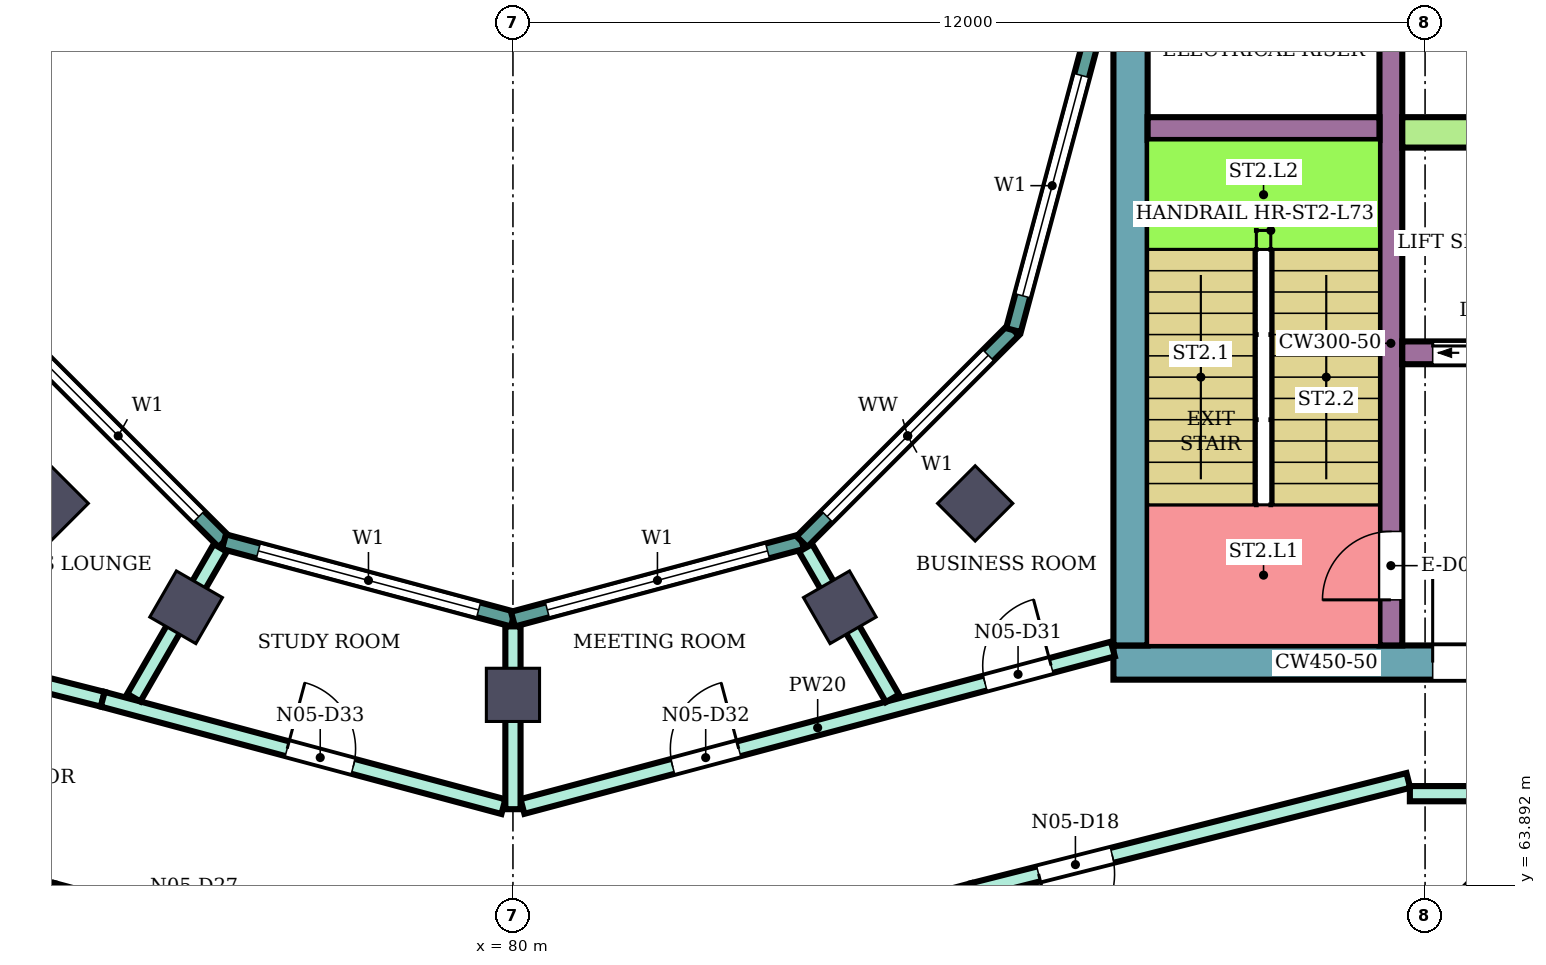
"""IFC4 building model, lengths in metres.
Left out: names, types, materials, properties, quantities, classifications, styles, units other than length and angle.
Written with IfcOpenShell. Run it as: python <this file> out.ifc"""

import sys

from ifc_helpers import new_model, si_unit, direction, frame, frame_2d, origin, origin_2d, place, context, subcontext, project, spatial, rectangle, extrude, element, fill, save


model = new_model("IFC4")
c1 = context("Model", 3, precision=1e-05, world=origin(), true_north=direction((0.0, 1.0)))
c2 = subcontext(c1, "Body", "Model", "MODEL_VIEW")
j1 = project(units=[si_unit("LENGTHUNIT", "METRE"), si_unit("PLANEANGLEUNIT", "RADIAN")], contexts=[c1])
p1 = place(None, origin())
s1 = spatial("IfcSite", under=j1, at=p1, CompositionType="ELEMENT")
p2 = place(p1, origin())
s2 = spatial("IfcBuilding", under=s1, at=p2, CompositionType="ELEMENT")
p3 = place(p2, frame((0.0, 0.0, 319.3)))
s3 = spatial("IfcBuildingStorey", under=s2, at=p3, CompositionType="ELEMENT", Elevation=319.3)
for number, where, z_axis, x_axis in (
    (1, (73.919, 68.919, 0.0), (0.0, 0.0, 1.0), (-0.707, -0.707, 0.0)),
    (2, (75.7, 67.552, 0.0), (0.0, 0.0, 1.0), (-0.5, -0.866, 0.0)),
    (3, (80.0, 66.4, 0.0), (0.0, 0.0, 1.0), (0.0, -1.0, 0.0)),
    (4, (84.3, 67.552, 0.0), (0.0, 0.0, 1.0), (0.5, -0.866, 0.0)),
    (5, (86.081, 68.919, 0.0), (0.0, 0.0, 1.0), (0.707, -0.707, 0.0)),
):
    element("IfcColumn", number, at=place(p3, frame(where, z_axis=z_axis, x_axis=x_axis)), inside=s3, PredefinedType="COLUMN", context=c2, shape_type="SweptSolid", body=[
        extrude(rectangle(XDim=0.7, YDim=0.7, at=origin_2d()), origin(), (0.0, 0.0, 1.0), 4.4),
    ])
p4 = place(p3, frame((92.233, 62.767, 0.0), z_axis=(0.0, 0.0, 1.0), x_axis=(0.707106781187, -0.707106781187, 0.0)))
e6 = element("IfcColumn", 6, at=p4, inside=s3, PredefinedType="COLUMN", context=c2, shape_type="SweptSolid", body=[
    extrude(rectangle(XDim=1.2, YDim=2.4, at=origin_2d()), origin(), (0.0, 0.0, 1.0), 4.4),
])
p5 = place(p3, frame((87.9, 66.825, 0.0), z_axis=(0.0, 0.0, 1.0), x_axis=(1.0, 0.0, 0.0)))
e7 = element("IfcWall", 7, at=p5, inside=s3, PredefinedType="SHEAR", context=c2, shape_type="SweptSolid", body=[
    extrude(rectangle(XDim=10.0, YDim=0.45, at=frame_2d((5.0, 0.0))), origin(), (0.0, 0.0, 1.0), 4.08),
])
p6 = place(p5, frame((4.2, 0.0, 0.0)))
e8 = element("IfcOpeningElement", 8, at=p6, cuts=e7, PredefinedType="OPENING", context=c2, shape_type="SweptSolid", body=[
    extrude(rectangle(XDim=2.4, YDim=2.4, at=frame_2d((1.2, 1.2))), frame((0.0, 0.235, 0.0), z_axis=(0.0, -1.0, 0.0), x_axis=(1.0, 0.0, 0.0)), (0.0, 0.0, 1.0), 0.47),
])
p7 = place(p3, frame((88.125, 67.05, 0.0), z_axis=(0.0, 0.0, 1.0), x_axis=(0.0, 1.0, 0.0)))
e9 = element("IfcWall", 9, at=p7, inside=s3, PredefinedType="SHEAR", context=c2, shape_type="SweptSolid", body=[
    extrude(rectangle(XDim=7.95, YDim=0.45, at=frame_2d((3.975, 0.0))), origin(), (0.0, 0.0, 1.0), 4.08),
])
p8 = place(p3, frame((91.55, 67.05, 0.0), z_axis=(0.0, 0.0, 1.0), x_axis=(0.0, 1.0, 0.0)))
e10 = element("IfcWall", 10, at=p8, inside=s3, PredefinedType="SHEAR", context=c2, shape_type="SweptSolid", body=[
    extrude(rectangle(XDim=7.95, YDim=0.3, at=frame_2d((3.975, 0.0))), origin(), (0.0, 0.0, 1.0), 4.08),
])
p9 = place(p8, frame((0.6, 0.0, 0.0)))
e11 = element("IfcOpeningElement", 11, at=p9, cuts=e10, PredefinedType="OPENING", context=c2, shape_type="SweptSolid", body=[
    extrude(rectangle(XDim=0.9, YDim=2.1, at=frame_2d((0.45, 1.05))), frame((0.0, 0.16, 0.0), z_axis=(0.0, -1.0, 0.0), x_axis=(1.0, 0.0, 0.0)), (0.0, 0.0, 1.0), 0.32),
])
p10 = place(p3, frame((88.35, 73.85, 0.0), z_axis=(0.0, 0.0, 1.0), x_axis=(1.0, 0.0, 0.0)))
e12 = element("IfcWall", 12, at=p10, inside=s3, PredefinedType="SHEAR", context=c2, shape_type="SweptSolid", body=[
    extrude(rectangle(XDim=3.05, YDim=0.3, at=frame_2d((1.525, 0.0))), origin(), (0.0, 0.0, 1.0), 4.08),
])
p11 = place(p3, frame((91.7, 73.8, 0.0), z_axis=(0.0, 0.0, 1.0), x_axis=(1.0, 0.0, 0.0)))
e13 = element("IfcWall", 13, at=p11, inside=s3, PredefinedType="SHEAR", context=c2, shape_type="SweptSolid", body=[
    extrude(rectangle(XDim=5.75, YDim=0.4, at=frame_2d((2.875, 0.0))), origin(), (0.0, 0.0, 1.0), 4.08),
])
p12 = place(p3, frame((91.7, 70.9, 0.0), z_axis=(0.0, 0.0, 1.0), x_axis=(1.0, 0.0, 0.0)))
e14 = element("IfcWall", 14, at=p12, inside=s3, PredefinedType="SHEAR", context=c2, shape_type="SweptSolid", body=[
    extrude(rectangle(XDim=7.3, YDim=0.3, at=frame_2d((3.65, 0.0))), origin(), (0.0, 0.0, 1.0), 4.08),
])
p13 = place(p12, frame((0.4, 0.0, 0.0)))
e15 = element("IfcOpeningElement", 15, at=p13, cuts=e14, PredefinedType="OPENING", context=c2, shape_type="SweptSolid", body=[
    extrude(rectangle(XDim=1.4, YDim=2.1, at=frame_2d((0.7, 1.05))), frame((0.0, 0.16, 0.0), z_axis=(0.0, -1.0, 0.0), x_axis=(1.0, 0.0, 0.0)), (0.0, 0.0, 1.0), 0.32),
])
p14 = place(p12, frame((3.0, 0.0, 0.0)))
e16 = element("IfcOpeningElement", 16, at=p14, cuts=e14, PredefinedType="OPENING", context=c2, shape_type="SweptSolid", body=[
    extrude(rectangle(XDim=1.2, YDim=2.1, at=frame_2d((0.6, 1.05))), frame((0.0, 0.16, 0.0), z_axis=(0.0, -1.0, 0.0), x_axis=(1.0, 0.0, 0.0)), (0.0, 0.0, 1.0), 0.32),
])
p15 = place(p12, frame((5.025, 0.0, 0.0)))
e17 = element("IfcOpeningElement", 17, at=p15, cuts=e14, PredefinedType="OPENING", context=c2, shape_type="SweptSolid", body=[
    extrude(rectangle(XDim=0.7, YDim=2.1, at=frame_2d((0.35, 1.05))), frame((0.0, 0.16, 0.0), z_axis=(0.0, -1.0, 0.0), x_axis=(1.0, 0.0, 0.0)), (0.0, 0.0, 1.0), 0.32),
])
p16 = place(p3, frame((73.415, 71.198, 0.0), z_axis=(0.0, 0.0, 1.0), x_axis=(0.707106781187, -0.707106781187, 0.0)))
e18 = element("IfcWall", 18, at=p16, inside=s3, PredefinedType="NOTDEFINED", context=c2, shape_type="SweptSolid", body=[
    extrude(rectangle(XDim=3.936, YDim=0.2, at=frame_2d((1.968, 0.0))), origin(), (0.0, 0.0, 1.0), 4.4),
])
p17 = place(p16, frame((0.468, 0.0, 0.9)))
e19 = element("IfcOpeningElement", 19, at=p17, cuts=e18, PredefinedType="OPENING", context=c2, shape_type="SweptSolid", body=[
    extrude(rectangle(XDim=3.0, YDim=2.3, at=frame_2d((1.5, 1.15))), frame((0.0, 0.11, 0.0), z_axis=(0.0, -1.0, 0.0), x_axis=(1.0, 0.0, 0.0)), (0.0, 0.0, 1.0), 0.22),
])
p18 = place(p3, frame((76.198, 68.415, 0.0), z_axis=(0.0, 0.0, 1.0), x_axis=(0.965933654434, -0.258789828301, 0.0)))
e20 = element("IfcWall", 20, at=p18, inside=s3, PredefinedType="NOTDEFINED", context=c2, shape_type="SweptSolid", body=[
    extrude(rectangle(XDim=3.936, YDim=0.2, at=frame_2d((1.968, 0.0))), origin(), (0.0, 0.0, 1.0), 4.4),
])
p19 = place(p18, frame((0.468, 0.0, 0.9)))
e21 = element("IfcOpeningElement", 21, at=p19, cuts=e20, PredefinedType="OPENING", context=c2, shape_type="SweptSolid", body=[
    extrude(rectangle(XDim=3.0, YDim=2.3, at=frame_2d((1.5, 1.15))), frame((0.0, 0.11, 0.0), z_axis=(0.0, -1.0, 0.0), x_axis=(1.0, 0.0, 0.0)), (0.0, 0.0, 1.0), 0.22),
])
p20 = place(p3, frame((80.0, 67.396, 0.0), z_axis=(0.0, 0.0, 1.0), x_axis=(0.965933654434, 0.258789828301, 0.0)))
e22 = element("IfcWall", 22, at=p20, inside=s3, PredefinedType="NOTDEFINED", context=c2, shape_type="SweptSolid", body=[
    extrude(rectangle(XDim=3.936, YDim=0.2, at=frame_2d((1.968, 0.0))), origin(), (0.0, 0.0, 1.0), 4.4),
])
p21 = place(p20, frame((0.468, 0.0, 0.9)))
e23 = element("IfcOpeningElement", 23, at=p21, cuts=e22, PredefinedType="OPENING", context=c2, shape_type="SweptSolid", body=[
    extrude(rectangle(XDim=3.0, YDim=2.3, at=frame_2d((1.5, 1.15))), frame((0.0, 0.11, 0.0), z_axis=(0.0, -1.0, 0.0), x_axis=(1.0, 0.0, 0.0)), (0.0, 0.0, 1.0), 0.22),
])
p22 = place(p3, frame((83.802, 68.415, 0.0), z_axis=(0.0, 0.0, 1.0), x_axis=(0.707106781187, 0.707106781187, 0.0)))
e24 = element("IfcWall", 24, at=p22, inside=s3, PredefinedType="NOTDEFINED", context=c2, shape_type="SweptSolid", body=[
    extrude(rectangle(XDim=3.936, YDim=0.2, at=frame_2d((1.968, 0.0))), origin(), (0.0, 0.0, 1.0), 4.4),
])
p23 = place(p22, frame((0.468, 0.0, 0.9)))
e25 = element("IfcOpeningElement", 25, at=p23, cuts=e24, PredefinedType="OPENING", context=c2, shape_type="SweptSolid", body=[
    extrude(rectangle(XDim=3.0, YDim=2.3, at=frame_2d((1.5, 1.15))), frame((0.0, 0.11, 0.0), z_axis=(0.0, -1.0, 0.0), x_axis=(1.0, 0.0, 0.0)), (0.0, 0.0, 1.0), 0.22),
])
p24 = place(p3, frame((86.585, 71.198, 0.0), z_axis=(0.0, 0.0, 1.0), x_axis=(0.258789828301, 0.965933654434, 0.0)))
e26 = element("IfcWall", 26, at=p24, inside=s3, PredefinedType="NOTDEFINED", context=c2, shape_type="SweptSolid", body=[
    extrude(rectangle(XDim=3.936, YDim=0.2, at=frame_2d((1.968, 0.0))), origin(), (0.0, 0.0, 1.0), 4.4),
])
p25 = place(p24, frame((0.468, 0.0, 0.9)))
e27 = element("IfcOpeningElement", 27, at=p25, cuts=e26, PredefinedType="OPENING", context=c2, shape_type="SweptSolid", body=[
    extrude(rectangle(XDim=3.0, YDim=2.3, at=frame_2d((1.5, 1.15))), frame((0.0, 0.11, 0.0), z_axis=(0.0, -1.0, 0.0), x_axis=(1.0, 0.0, 0.0)), (0.0, 0.0, 1.0), 0.22),
])
p26 = place(p3, frame((68.201, 65.28, 0.0), z_axis=(0.0, 0.0, 1.0), x_axis=(0.969421088032, -0.245403247897, 0.0)))
e28 = element("IfcWall", 28, at=p26, inside=s3, PredefinedType="PARTITIONING", context=c2, shape_type="SweptSolid", body=[
    extrude(rectangle(XDim=5.927, YDim=0.2, at=frame_2d((2.964, 0.0))), origin(), (0.0, 0.0, 1.0), 3.95),
])
p27 = place(p3, frame((72.1, 66.975, 0.0), z_axis=(0.0, 0.0, 1.0), x_axis=(0.969471314457, -0.245204752086, 0.0)))
e29 = element("IfcWall", 29, at=p27, inside=s3, PredefinedType="PARTITIONING", context=c2, shape_type="SweptSolid", body=[
    extrude(rectangle(XDim=2.582, YDim=0.2, at=frame_2d((1.291, 0.0))), origin(), (0.0, 0.0, 1.0), 3.95),
])
p28 = place(p27, frame((0.841, 0.0, 0.0)))
e30 = element("IfcOpeningElement", 30, at=p28, cuts=e29, PredefinedType="OPENING", context=c2, shape_type="SweptSolid", body=[
    extrude(rectangle(XDim=0.9, YDim=2.1, at=frame_2d((0.45, 1.05))), frame((0.0, 0.11, 0.0), z_axis=(0.0, -1.0, 0.0), x_axis=(1.0, 0.0, 0.0)), (0.0, 0.0, 1.0), 0.22),
])
p29 = place(p3, frame((73.947, 63.826, 0.0), z_axis=(0.0, 0.0, 1.0), x_axis=(0.965894934009, -0.25893430915, 0.0)))
e31 = element("IfcWall", 31, at=p29, inside=s3, PredefinedType="PARTITIONING", context=c2, shape_type="SweptSolid", body=[
    extrude(rectangle(XDim=6.177, YDim=0.2, at=frame_2d((3.088, 0.0))), origin(), (0.0, 0.0, 1.0), 3.95),
])
p30 = place(p29, frame((3.336, 0.0, 0.0)))
e32 = element("IfcOpeningElement", 32, at=p30, cuts=e31, PredefinedType="OPENING", context=c2, shape_type="SweptSolid", body=[
    extrude(rectangle(XDim=1.0, YDim=2.1, at=frame_2d((0.5, 1.05))), frame((0.0, 0.11, 0.0), z_axis=(0.0, -1.0, 0.0), x_axis=(1.0, 0.0, 0.0)), (0.0, 0.0, 1.0), 0.22),
])
p31 = place(p29, frame((1.424, 0.0, 0.0)))
e33 = element("IfcOpeningElement", 33, at=p31, cuts=e31, PredefinedType="OPENING", context=c2, shape_type="SweptSolid", body=[
    extrude(rectangle(XDim=1.0, YDim=2.1, at=frame_2d((0.5, 1.05))), frame((0.0, 0.11, 0.0), z_axis=(0.0, -1.0, 0.0), x_axis=(1.0, 0.0, 0.0)), (0.0, 0.0, 1.0), 0.22),
])
p32 = place(p3, frame((74.603, 66.342, 0.0), z_axis=(0.0, 0.0, 1.0), x_axis=(0.965920893652, -0.258837453254, 0.0)))
e34 = element("IfcWall", 34, at=p32, inside=s3, PredefinedType="PARTITIONING", context=c2, shape_type="SweptSolid", body=[
    extrude(rectangle(XDim=5.458, YDim=0.2, at=frame_2d((2.729, 0.0))), origin(), (0.0, 0.0, 1.0), 3.95),
])
p33 = place(p32, frame((2.512, 0.0, 0.0)))
e35 = element("IfcOpeningElement", 35, at=p33, cuts=e34, PredefinedType="OPENING", context=c2, shape_type="SweptSolid", body=[
    extrude(rectangle(XDim=0.9, YDim=2.1, at=frame_2d((0.45, 1.05))), frame((0.0, 0.11, 0.0), z_axis=(0.0, -1.0, 0.0), x_axis=(1.0, 0.0, 0.0)), (0.0, 0.0, 1.0), 0.22),
])
p34 = place(p3, frame((75.012, 66.363, 0.0), z_axis=(0.0, 0.0, 1.0), x_axis=(0.500143511652, 0.865942531438, 0.0)))
e36 = element("IfcWall", 36, at=p34, inside=s3, PredefinedType="PARTITIONING", context=c2, shape_type="SweptSolid", body=[
    extrude(rectangle(XDim=2.275, YDim=0.2, at=frame_2d((1.138, 0.0))), origin(), (0.0, 0.0, 1.0), 3.95),
])
p35 = place(p3, frame((80.125, 64.932, 0.0), z_axis=(0.0, 0.0, 1.0), x_axis=(0.966236955806, 0.257655089674, 0.0)))
e37 = element("IfcWall", 37, at=p35, inside=s3, PredefinedType="PARTITIONING", context=c2, shape_type="SweptSolid", body=[
    extrude(rectangle(XDim=8.039, YDim=0.2, at=frame_2d((4.02, 0.0))), origin(), (0.0, 0.0, 1.0), 3.95),
])
p36 = place(p35, frame((6.298, 0.0, 0.0)))
e38 = element("IfcOpeningElement", 38, at=p36, cuts=e37, PredefinedType="OPENING", context=c2, shape_type="SweptSolid", body=[
    extrude(rectangle(XDim=0.9, YDim=2.1, at=frame_2d((0.45, 1.05))), frame((0.0, 0.11, 0.0), z_axis=(0.0, -1.0, 0.0), x_axis=(1.0, 0.0, 0.0)), (0.0, 0.0, 1.0), 0.22),
])
p37 = place(p35, frame((2.045, 0.0, 0.0)))
e39 = element("IfcOpeningElement", 39, at=p37, cuts=e37, PredefinedType="OPENING", context=c2, shape_type="SweptSolid", body=[
    extrude(rectangle(XDim=0.9, YDim=2.1, at=frame_2d((0.45, 1.05))), frame((0.0, 0.11, 0.0), z_axis=(0.0, -1.0, 0.0), x_axis=(1.0, 0.0, 0.0)), (0.0, 0.0, 1.0), 0.22),
])
p38 = place(p3, frame((80.0, 62.204, 0.0), z_axis=(0.0, 0.0, 1.0), x_axis=(0.965938139786, 0.258773086132, 0.0)))
e40 = element("IfcWall", 40, at=p38, inside=s3, PredefinedType="PARTITIONING", context=c2, shape_type="SweptSolid", body=[
    extrude(rectangle(XDim=6.266, YDim=0.2, at=frame_2d((3.133, 0.0))), origin(), (0.0, 0.0, 1.0), 3.95),
])
p39 = place(p3, frame((80.0, 64.896, 0.0), z_axis=(0.0, 0.0, 1.0), x_axis=(0.0, 1.0, 0.0)))
e41 = element("IfcWall", 41, at=p39, inside=s3, PredefinedType="PARTITIONING", context=c2, shape_type="SweptSolid", body=[
    extrude(rectangle(XDim=2.405, YDim=0.2, at=frame_2d((1.203, 0.0))), origin(), (0.0, 0.0, 1.0), 3.95),
])
p40 = place(p3, frame((83.85, 68.333, 0.0), z_axis=(0.0, 0.0, 1.0), x_axis=(0.500080019051, -0.865979199835, 0.0)))
e42 = element("IfcWall", 42, at=p40, inside=s3, PredefinedType="PARTITIONING", context=c2, shape_type="SweptSolid", body=[
    extrude(rectangle(XDim=2.285, YDim=0.2, at=frame_2d((1.143, 0.0))), origin(), (0.0, 0.0, 1.0), 3.95),
])
p41 = place(p3, frame((86.053, 63.826, 0.0), z_axis=(0.0, 0.0, 1.0), x_axis=(0.969480070232, 0.245170131586, 0.0)))
e43 = element("IfcWall", 43, at=p41, inside=s3, PredefinedType="PARTITIONING", context=c2, shape_type="SweptSolid", body=[
    extrude(rectangle(XDim=5.907, YDim=0.2, at=frame_2d((2.954, 0.0))), origin(), (0.0, 0.0, 1.0), 3.95),
])
p42 = place(p41, frame((0.889, 0.0, 0.0)))
e44 = element("IfcOpeningElement", 44, at=p42, cuts=e43, PredefinedType="OPENING", context=c2, shape_type="SweptSolid", body=[
    extrude(rectangle(XDim=1.0, YDim=2.1, at=frame_2d((0.5, 1.05))), frame((0.0, 0.11, 0.0), z_axis=(0.0, -1.0, 0.0), x_axis=(1.0, 0.0, 0.0)), (0.0, 0.0, 1.0), 0.22),
])
p43 = place(p3, frame((91.8, 65.1, 0.0), z_axis=(0.0, 0.0, 1.0), x_axis=(1.0, 0.0, 0.0)))
e45 = element("IfcWall", 45, at=p43, inside=s3, PredefinedType="PARTITIONING", context=c2, shape_type="SweptSolid", body=[
    extrude(rectangle(XDim=2.9, YDim=0.2, at=frame_2d((1.45, 0.0))), origin(), (0.0, 0.0, 1.0), 3.95),
])
p44 = place(p17, origin())
e46 = element("IfcWindow", 46, at=p44, inside=s3, PartitioningType="SINGLE_PANEL", PredefinedType="WINDOW", context=c2, shape_type="SweptSolid", body=[
    extrude(rectangle(XDim=3.0, YDim=2.3, at=frame_2d((1.5, 1.15))), frame((0.0, 0.03, 0.0), z_axis=(0.0, -1.0, 0.0), x_axis=(1.0, 0.0, 0.0)), (0.0, 0.0, 1.0), 0.06),
])
fill(e19, e46)
p45 = place(p19, origin())
e47 = element("IfcWindow", 47, at=p45, inside=s3, PartitioningType="SINGLE_PANEL", PredefinedType="WINDOW", context=c2, shape_type="SweptSolid", body=[
    extrude(rectangle(XDim=3.0, YDim=2.3, at=frame_2d((1.5, 1.15))), frame((0.0, 0.03, 0.0), z_axis=(0.0, -1.0, 0.0), x_axis=(1.0, 0.0, 0.0)), (0.0, 0.0, 1.0), 0.06),
])
fill(e21, e47)
p46 = place(p21, origin())
e48 = element("IfcWindow", 48, at=p46, inside=s3, PartitioningType="SINGLE_PANEL", PredefinedType="WINDOW", context=c2, shape_type="SweptSolid", body=[
    extrude(rectangle(XDim=3.0, YDim=2.3, at=frame_2d((1.5, 1.15))), frame((0.0, 0.03, 0.0), z_axis=(0.0, -1.0, 0.0), x_axis=(1.0, 0.0, 0.0)), (0.0, 0.0, 1.0), 0.06),
])
fill(e23, e48)
p47 = place(p23, origin())
e49 = element("IfcWindow", 49, at=p47, inside=s3, PartitioningType="SINGLE_PANEL", PredefinedType="WINDOW", context=c2, shape_type="SweptSolid", body=[
    extrude(rectangle(XDim=3.0, YDim=2.3, at=frame_2d((1.5, 1.15))), frame((0.0, 0.03, 0.0), z_axis=(0.0, -1.0, 0.0), x_axis=(1.0, 0.0, 0.0)), (0.0, 0.0, 1.0), 0.06),
])
fill(e25, e49)
p48 = place(p25, origin())
e50 = element("IfcWindow", 50, at=p48, inside=s3, PartitioningType="SINGLE_PANEL", PredefinedType="WINDOW", context=c2, shape_type="SweptSolid", body=[
    extrude(rectangle(XDim=3.0, YDim=2.3, at=frame_2d((1.5, 1.15))), frame((0.0, 0.03, 0.0), z_axis=(0.0, -1.0, 0.0), x_axis=(1.0, 0.0, 0.0)), (0.0, 0.0, 1.0), 0.06),
])
fill(e27, e50)
p49 = place(p42, frame((1.0, 0.0, 0.0), z_axis=(0.0, 0.0, 1.0), x_axis=(-1.0, 0.0, 0.0)))
e51 = element("IfcDoor", 51, at=p49, inside=s3, OperationType="SINGLE_SWING_RIGHT", PredefinedType="DOOR", context=c2, shape_type="SweptSolid", body=[
    extrude(rectangle(XDim=1.0, YDim=2.1, at=frame_2d((0.5, 1.05))), frame((0.0, 0.025, 0.0), z_axis=(0.0, -1.0, 0.0), x_axis=(1.0, 0.0, 0.0)), (0.0, 0.0, 1.0), 0.05),
])
fill(e44, e51)
p50 = place(p36, origin())
e52 = element("IfcDoor", 52, at=p50, inside=s3, OperationType="SINGLE_SWING_RIGHT", PredefinedType="DOOR", context=c2, shape_type="SweptSolid", body=[
    extrude(rectangle(XDim=0.9, YDim=2.1, at=frame_2d((0.45, 1.05))), frame((0.0, 0.025, 0.0), z_axis=(0.0, -1.0, 0.0), x_axis=(1.0, 0.0, 0.0)), (0.0, 0.0, 1.0), 0.05),
])
fill(e38, e52)
p51 = place(p37, origin())
e53 = element("IfcDoor", 53, at=p51, inside=s3, OperationType="SINGLE_SWING_RIGHT", PredefinedType="DOOR", context=c2, shape_type="SweptSolid", body=[
    extrude(rectangle(XDim=0.9, YDim=2.1, at=frame_2d((0.45, 1.05))), frame((0.0, 0.025, 0.0), z_axis=(0.0, -1.0, 0.0), x_axis=(1.0, 0.0, 0.0)), (0.0, 0.0, 1.0), 0.05),
])
fill(e39, e53)
p52 = place(p33, origin())
e54 = element("IfcDoor", 54, at=p52, inside=s3, OperationType="SINGLE_SWING_LEFT", PredefinedType="DOOR", context=c2, shape_type="SweptSolid", body=[
    extrude(rectangle(XDim=0.9, YDim=2.1, at=frame_2d((0.45, 1.05))), frame((0.0, 0.025, 0.0), z_axis=(0.0, -1.0, 0.0), x_axis=(1.0, 0.0, 0.0)), (0.0, 0.0, 1.0), 0.05),
])
fill(e35, e54)
p53 = place(p9, origin())
e55 = element("IfcDoor", 55, at=p53, inside=s3, OperationType="SINGLE_SWING_LEFT", PredefinedType="DOOR", context=c2, shape_type="SweptSolid", body=[
    extrude(rectangle(XDim=0.9, YDim=2.1, at=frame_2d((0.45, 1.05))), frame((0.0, 0.025, 0.0), z_axis=(0.0, -1.0, 0.0), x_axis=(1.0, 0.0, 0.0)), (0.0, 0.0, 1.0), 0.05),
])
fill(e11, e55)
p54 = place(p13, origin())
e56 = element("IfcDoor", 56, at=p54, inside=s3, OperationType="DOUBLE_DOOR_SLIDING", PredefinedType="DOOR", context=c2, shape_type="SweptSolid", body=[
    extrude(rectangle(XDim=1.4, YDim=2.1, at=frame_2d((0.7, 1.05))), frame((0.0, 0.025, 0.0), z_axis=(0.0, -1.0, 0.0), x_axis=(1.0, 0.0, 0.0)), (0.0, 0.0, 1.0), 0.05),
])
fill(e15, e56)
p55 = place(p6, origin())
e57 = element("IfcDoor", 57, at=p55, inside=s3, OperationType="DOUBLE_DOOR_SINGLE_SWING", PredefinedType="DOOR", context=c2, shape_type="SweptSolid", body=[
    extrude(rectangle(XDim=2.4, YDim=2.4, at=frame_2d((1.2, 1.2))), frame((0.0, 0.025, 0.0), z_axis=(0.0, -1.0, 0.0), x_axis=(1.0, 0.0, 0.0)), (0.0, 0.0, 1.0), 0.05),
])
fill(e8, e57)
save(model, sys.argv[1])
